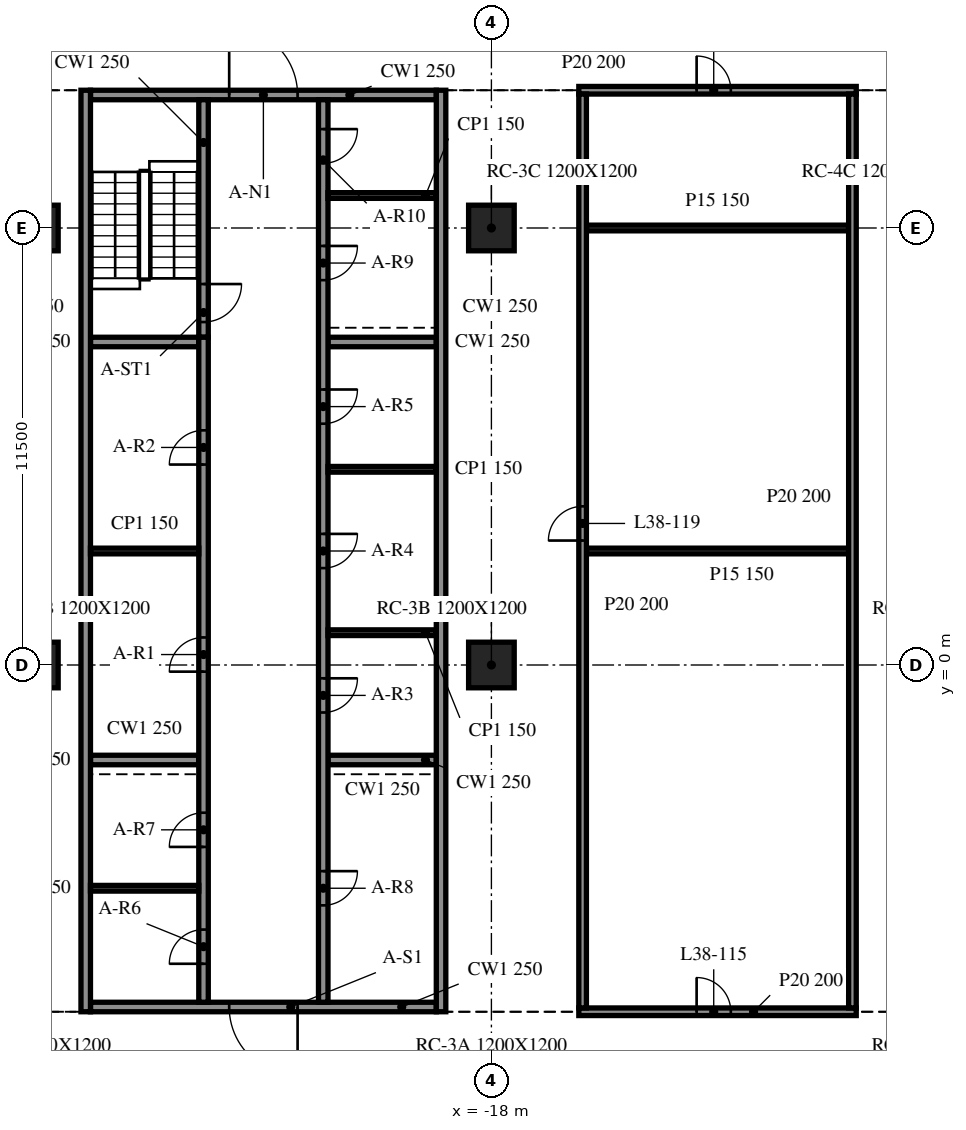
"""IFC4 building model, lengths in metres.
Left out: names, types, materials, properties, quantities, classifications, styles, units other than length and angle.
Written with IfcOpenShell. Run it as: python <this file> out.ifc"""

import sys

from ifc_helpers import new_model, si_unit, direction, frame, frame_2d, origin, origin_2d, place, context, subcontext, project, spatial, rectangle, extrude, element, fill, save


model = new_model("IFC4")
c1 = context("Model", 3, precision=1e-05, world=origin(), true_north=direction((0.0, 1.0)))
c2 = subcontext(c1, "Body", "Model", "MODEL_VIEW")
j1 = project(units=[si_unit("LENGTHUNIT", "METRE"), si_unit("PLANEANGLEUNIT", "RADIAN")], contexts=[c1])
p1 = place(None, origin())
s1 = spatial("IfcSite", under=j1, at=p1, CompositionType="ELEMENT")
p2 = place(p1, origin())
s2 = spatial("IfcBuilding", under=s1, at=p2, CompositionType="ELEMENT")
p3 = place(p2, frame((0.0, 0.0, 163.0)))
s3 = spatial("IfcBuildingStorey", under=s2, at=p3, CompositionType="ELEMENT", Elevation=163.0)
for number, where, z_axis, x_axis in (
    (1, (-30.0, 0.0, -0.34), (0.0, 0.0, 1.0), (1.0, 0.0, 0.0)),
    (2, (-30.0, 11.5, -0.34), (0.0, 0.0, 1.0), (1.0, 0.0, 0.0)),
    (3, (-18.0, 0.0, -0.34), (0.0, 0.0, 1.0), (1.0, 0.0, 0.0)),
    (4, (-18.0, 11.5, -0.34), (0.0, 0.0, 1.0), (1.0, 0.0, 0.0)),
):
    element("IfcColumn", number, at=place(p3, frame(where, z_axis=z_axis, x_axis=x_axis)), inside=s3, PredefinedType="COLUMN", context=c2, shape_type="SweptSolid", body=[
        extrude(rectangle(XDim=1.2, YDim=1.2, at=origin_2d()), origin(), (0.0, 0.0, 1.0), 3.8),
    ])
for number, where, z_axis, x_axis in (
    (5, (-28.675, 15.125, 0.0), (0.0, 0.0, 1.0), (0.0, -1.0, 0.0)),
    (6, (-19.325, -9.125, 0.0), (0.0, 0.0, 1.0), (0.0, 1.0, 0.0)),
):
    element("IfcWall", number, at=place(p3, frame(where, z_axis=z_axis, x_axis=x_axis)), inside=s3, PredefinedType="SOLIDWALL", context=c2, shape_type="SweptSolid", body=[
        extrude(rectangle(XDim=24.25, YDim=0.25, at=frame_2d((12.125, 0.0))), origin(), (0.0, 0.0, 1.0), 3.46),
    ])
p4 = place(p3, frame((-19.45, -9.0, 0.0), z_axis=(0.0, 0.0, 1.0), x_axis=(-1.0, 0.0, 0.0)))
e7 = element("IfcWall", 7, at=p4, inside=s3, PredefinedType="SOLIDWALL", context=c2, shape_type="SweptSolid", body=[
    extrude(rectangle(XDim=9.1, YDim=0.25, at=frame_2d((4.55, 0.0))), origin(), (0.0, 0.0, 1.0), 3.46),
])
p5 = place(p4, frame((3.65, 0.0, 0.0)))
e8 = element("IfcOpeningElement", 8, at=p5, cuts=e7, PredefinedType="OPENING", context=c2, shape_type="SweptSolid", body=[
    extrude(rectangle(XDim=1.8, YDim=2.1, at=frame_2d((0.9, 1.05))), frame((0.0, 0.135, 0.0), z_axis=(0.0, -1.0, 0.0), x_axis=(1.0, 0.0, 0.0)), (0.0, 0.0, 1.0), 0.27),
])
p6 = place(p3, frame((-28.55, 15.0, 0.0), z_axis=(0.0, 0.0, 1.0), x_axis=(1.0, 0.0, 0.0)))
e9 = element("IfcWall", 9, at=p6, inside=s3, PredefinedType="SOLIDWALL", context=c2, shape_type="SweptSolid", body=[
    extrude(rectangle(XDim=9.1, YDim=0.25, at=frame_2d((4.55, 0.0))), origin(), (0.0, 0.0, 1.0), 3.46),
])
p7 = place(p6, frame((3.65, 0.0, 0.0)))
e10 = element("IfcOpeningElement", 10, at=p7, cuts=e9, PredefinedType="OPENING", context=c2, shape_type="SweptSolid", body=[
    extrude(rectangle(XDim=1.8, YDim=2.1, at=frame_2d((0.9, 1.05))), frame((0.0, 0.135, 0.0), z_axis=(0.0, -1.0, 0.0), x_axis=(1.0, 0.0, 0.0)), (0.0, 0.0, 1.0), 0.27),
])
p8 = place(p3, frame((-25.575, -8.875, 0.0), z_axis=(0.0, 0.0, 1.0), x_axis=(0.0, 1.0, 0.0)))
e11 = element("IfcWall", 11, at=p8, inside=s3, PredefinedType="SOLIDWALL", context=c2, shape_type="SweptSolid", body=[
    extrude(rectangle(XDim=17.5, YDim=0.25, at=frame_2d((8.75, 0.0))), origin(), (0.0, 0.0, 1.0), 3.46),
])
p9 = place(p8, frame((8.7, 0.0, 0.0)))
e12 = element("IfcOpeningElement", 12, at=p9, cuts=e11, PredefinedType="OPENING", context=c2, shape_type="SweptSolid", body=[
    extrude(rectangle(XDim=0.9, YDim=2.1, at=frame_2d((0.45, 1.05))), frame((0.0, 0.135, 0.0), z_axis=(0.0, -1.0, 0.0), x_axis=(1.0, 0.0, 0.0)), (0.0, 0.0, 1.0), 0.27),
])
p10 = place(p8, frame((14.15, 0.0, 0.0)))
e13 = element("IfcOpeningElement", 13, at=p10, cuts=e11, PredefinedType="OPENING", context=c2, shape_type="SweptSolid", body=[
    extrude(rectangle(XDim=0.9, YDim=2.1, at=frame_2d((0.45, 1.05))), frame((0.0, 0.135, 0.0), z_axis=(0.0, -1.0, 0.0), x_axis=(1.0, 0.0, 0.0)), (0.0, 0.0, 1.0), 0.27),
])
p11 = place(p8, frame((1.012, 0.0, 0.0)))
e14 = element("IfcOpeningElement", 14, at=p11, cuts=e11, PredefinedType="OPENING", context=c2, shape_type="SweptSolid", body=[
    extrude(rectangle(XDim=0.9, YDim=2.1, at=frame_2d((0.45, 1.05))), frame((0.0, 0.135, 0.0), z_axis=(0.0, -1.0, 0.0), x_axis=(1.0, 0.0, 0.0)), (0.0, 0.0, 1.0), 0.27),
])
p12 = place(p8, frame((4.087, 0.0, 0.0)))
e15 = element("IfcOpeningElement", 15, at=p12, cuts=e11, PredefinedType="OPENING", context=c2, shape_type="SweptSolid", body=[
    extrude(rectangle(XDim=0.9, YDim=2.1, at=frame_2d((0.45, 1.05))), frame((0.0, 0.135, 0.0), z_axis=(0.0, -1.0, 0.0), x_axis=(1.0, 0.0, 0.0)), (0.0, 0.0, 1.0), 0.27),
])
p13 = place(p3, frame((-25.575, 14.875, 0.0), z_axis=(0.0, 0.0, 1.0), x_axis=(0.0, -1.0, 0.0)))
e16 = element("IfcWall", 16, at=p13, inside=s3, PredefinedType="SOLIDWALL", context=c2, shape_type="SweptSolid", body=[
    extrude(rectangle(XDim=6.25, YDim=0.25, at=frame_2d((3.125, 0.0))), origin(), (0.0, 0.0, 1.0), 3.46),
])
p14 = place(p13, frame((4.85, 0.0, 0.0)))
e17 = element("IfcOpeningElement", 17, at=p14, cuts=e16, PredefinedType="OPENING", context=c2, shape_type="SweptSolid", body=[
    extrude(rectangle(XDim=1.0, YDim=2.1, at=frame_2d((0.5, 1.05))), frame((0.0, 0.135, 0.0), z_axis=(0.0, -1.0, 0.0), x_axis=(1.0, 0.0, 0.0)), (0.0, 0.0, 1.0), 0.27),
])
p15 = place(p3, frame((-22.425, 14.875, 0.0), z_axis=(0.0, 0.0, 1.0), x_axis=(0.0, -1.0, 0.0)))
e18 = element("IfcWall", 18, at=p15, inside=s3, PredefinedType="SOLIDWALL", context=c2, shape_type="SweptSolid", body=[
    extrude(rectangle(XDim=23.75, YDim=0.25, at=frame_2d((11.875, 0.0))), origin(), (0.0, 0.0, 1.0), 3.46),
])
p16 = place(p15, frame((15.225, 0.0, 0.0)))
e19 = element("IfcOpeningElement", 19, at=p16, cuts=e18, PredefinedType="OPENING", context=c2, shape_type="SweptSolid", body=[
    extrude(rectangle(XDim=0.9, YDim=2.1, at=frame_2d((0.45, 1.05))), frame((0.0, 0.135, 0.0), z_axis=(0.0, -1.0, 0.0), x_axis=(1.0, 0.0, 0.0)), (0.0, 0.0, 1.0), 0.27),
])
p17 = place(p15, frame((11.425, 0.0, 0.0)))
e20 = element("IfcOpeningElement", 20, at=p17, cuts=e18, PredefinedType="OPENING", context=c2, shape_type="SweptSolid", body=[
    extrude(rectangle(XDim=0.9, YDim=2.1, at=frame_2d((0.45, 1.05))), frame((0.0, 0.135, 0.0), z_axis=(0.0, -1.0, 0.0), x_axis=(1.0, 0.0, 0.0)), (0.0, 0.0, 1.0), 0.27),
])
p18 = place(p15, frame((7.625, 0.0, 0.0)))
e21 = element("IfcOpeningElement", 21, at=p18, cuts=e18, PredefinedType="OPENING", context=c2, shape_type="SweptSolid", body=[
    extrude(rectangle(XDim=0.9, YDim=2.1, at=frame_2d((0.45, 1.05))), frame((0.0, 0.135, 0.0), z_axis=(0.0, -1.0, 0.0), x_axis=(1.0, 0.0, 0.0)), (0.0, 0.0, 1.0), 0.27),
])
p19 = place(p15, frame((20.3, 0.0, 0.0)))
e22 = element("IfcOpeningElement", 22, at=p19, cuts=e18, PredefinedType="OPENING", context=c2, shape_type="SweptSolid", body=[
    extrude(rectangle(XDim=0.9, YDim=2.1, at=frame_2d((0.45, 1.05))), frame((0.0, 0.135, 0.0), z_axis=(0.0, -1.0, 0.0), x_axis=(1.0, 0.0, 0.0)), (0.0, 0.0, 1.0), 0.27),
])
p20 = place(p15, frame((3.847, 0.0, 0.0)))
e23 = element("IfcOpeningElement", 23, at=p20, cuts=e18, PredefinedType="OPENING", context=c2, shape_type="SweptSolid", body=[
    extrude(rectangle(XDim=0.9, YDim=2.1, at=frame_2d((0.45, 1.05))), frame((0.0, 0.135, 0.0), z_axis=(0.0, -1.0, 0.0), x_axis=(1.0, 0.0, 0.0)), (0.0, 0.0, 1.0), 0.27),
])
p21 = place(p15, frame((0.772, 0.0, 0.0)))
e24 = element("IfcOpeningElement", 24, at=p21, cuts=e18, PredefinedType="OPENING", context=c2, shape_type="SweptSolid", body=[
    extrude(rectangle(XDim=0.9, YDim=2.1, at=frame_2d((0.45, 1.05))), frame((0.0, 0.135, 0.0), z_axis=(0.0, -1.0, 0.0), x_axis=(1.0, 0.0, 0.0)), (0.0, 0.0, 1.0), 0.27),
])
for number, where, z_axis, x_axis in (
    (25, (-28.55, -2.5, 0.0), (0.0, 0.0, 1.0), (1.0, 0.0, 0.0)),
    (26, (-28.55, 8.5, 0.0), (0.0, 0.0, 1.0), (1.0, 0.0, 0.0)),
    (27, (-22.3, -2.5, 0.0), (0.0, 0.0, 1.0), (1.0, 0.0, 0.0)),
    (28, (-22.3, 8.5, 0.0), (0.0, 0.0, 1.0), (1.0, 0.0, 0.0)),
):
    element("IfcWall", number, at=place(p3, frame(where, z_axis=z_axis, x_axis=x_axis)), inside=s3, PredefinedType="SOLIDWALL", context=c2, shape_type="SweptSolid", body=[
        extrude(rectangle(XDim=2.85, YDim=0.25, at=frame_2d((1.425, 0.0))), origin(), (0.0, 0.0, 1.0), 3.46),
    ])
for number, where, z_axis, x_axis in (
    (29, (-28.55, 3.0, 0.0), (0.0, 0.0, 1.0), (1.0, 0.0, 0.0)),
    (30, (-22.3, 0.85, 0.0), (0.0, 0.0, 1.0), (1.0, 0.0, 0.0)),
    (31, (-22.3, 5.15, 0.0), (0.0, 0.0, 1.0), (1.0, 0.0, 0.0)),
    (32, (-28.55, -5.875, 0.0), (0.0, 0.0, 1.0), (1.0, 0.0, 0.0)),
    (33, (-22.3, 12.355, 0.0), (0.0, 0.0, 1.0), (1.0, 0.0, 0.0)),
):
    element("IfcWall", number, at=place(p3, frame(where, z_axis=z_axis, x_axis=x_axis)), inside=s3, PredefinedType="PARTITIONING", context=c2, shape_type="SweptSolid", body=[
        extrude(rectangle(XDim=2.85, YDim=0.15, at=frame_2d((1.425, 0.0))), origin(), (0.0, 0.0, 1.0), 3.46),
    ])
p22 = place(p3, frame((-15.7, -9.125, 0.0), z_axis=(0.0, 0.0, 1.0), x_axis=(1.0, 0.0, 0.0)))
e34 = element("IfcWall", 34, at=p22, inside=s3, PredefinedType="PARTITIONING", context=c2, shape_type="SweptSolid", body=[
    extrude(rectangle(XDim=7.3, YDim=0.2, at=frame_2d((3.65, 0.0))), origin(), (0.0, 0.0, 1.0), 3.46),
])
p23 = place(p22, frame((3.1, 0.0, 0.0)))
e35 = element("IfcOpeningElement", 35, at=p23, cuts=e34, PredefinedType="OPENING", context=c2, shape_type="SweptSolid", body=[
    extrude(rectangle(XDim=0.9, YDim=2.1, at=frame_2d((0.45, 1.05))), frame((0.0, 0.11, 0.0), z_axis=(0.0, -1.0, 0.0), x_axis=(1.0, 0.0, 0.0)), (0.0, 0.0, 1.0), 0.22),
])
for number, where, z_axis, x_axis in (
    (36, (-15.5, 3.0, 0.0), (0.0, 0.0, 1.0), (1.0, 0.0, 0.0)),
    (37, (-15.5, 11.5, 0.0), (0.0, 0.0, 1.0), (1.0, 0.0, 0.0)),
):
    element("IfcWall", number, at=place(p3, frame(where, z_axis=z_axis, x_axis=x_axis)), inside=s3, PredefinedType="PARTITIONING", context=c2, shape_type="SweptSolid", body=[
        extrude(rectangle(XDim=6.9, YDim=0.15, at=frame_2d((3.45, 0.0))), origin(), (0.0, 0.0, 1.0), 3.46),
    ])
p24 = place(p3, frame((-15.7, 15.125, 0.0), z_axis=(0.0, 0.0, 1.0), x_axis=(1.0, 0.0, 0.0)))
e38 = element("IfcWall", 38, at=p24, inside=s3, PredefinedType="PARTITIONING", context=c2, shape_type="SweptSolid", body=[
    extrude(rectangle(XDim=7.3, YDim=0.2, at=frame_2d((3.65, 0.0))), origin(), (0.0, 0.0, 1.0), 3.46),
])
p25 = place(p24, frame((3.1, 0.0, 0.0)))
e39 = element("IfcOpeningElement", 39, at=p25, cuts=e38, PredefinedType="OPENING", context=c2, shape_type="SweptSolid", body=[
    extrude(rectangle(XDim=0.9, YDim=2.1, at=frame_2d((0.45, 1.05))), frame((0.0, 0.11, 0.0), z_axis=(0.0, -1.0, 0.0), x_axis=(1.0, 0.0, 0.0)), (0.0, 0.0, 1.0), 0.22),
])
p26 = place(p3, frame((-15.6, -9.025, 0.0), z_axis=(0.0, 0.0, 1.0), x_axis=(0.0, 1.0, 0.0)))
e40 = element("IfcWall", 40, at=p26, inside=s3, PredefinedType="PARTITIONING", context=c2, shape_type="SweptSolid", body=[
    extrude(rectangle(XDim=24.05, YDim=0.2, at=frame_2d((12.025, 0.0))), origin(), (0.0, 0.0, 1.0), 3.46),
])
p27 = place(p26, frame((12.3, 0.0, 0.0)))
e41 = element("IfcOpeningElement", 41, at=p27, cuts=e40, PredefinedType="OPENING", context=c2, shape_type="SweptSolid", body=[
    extrude(rectangle(XDim=0.9, YDim=2.1, at=frame_2d((0.45, 1.05))), frame((0.0, 0.11, 0.0), z_axis=(0.0, -1.0, 0.0), x_axis=(1.0, 0.0, 0.0)), (0.0, 0.0, 1.0), 0.22),
])
p28 = place(p3, frame((-8.5, -9.025, 0.0), z_axis=(0.0, 0.0, 1.0), x_axis=(0.0, 1.0, 0.0)))
e42 = element("IfcWall", 42, at=p28, inside=s3, PredefinedType="PARTITIONING", context=c2, shape_type="SweptSolid", body=[
    extrude(rectangle(XDim=24.05, YDim=0.2, at=frame_2d((12.025, 0.0))), origin(), (0.0, 0.0, 1.0), 3.46),
])
p29 = place(p5, origin())
e43 = element("IfcDoor", 43, at=p29, inside=s3, OperationType="DOUBLE_DOOR_SINGLE_SWING", PredefinedType="DOOR", context=c2, shape_type="SweptSolid", body=[
    extrude(rectangle(XDim=1.8, YDim=2.1, at=frame_2d((0.9, 1.05))), frame((0.0, 0.025, 0.0), z_axis=(0.0, -1.0, 0.0), x_axis=(1.0, 0.0, 0.0)), (0.0, 0.0, 1.0), 0.05),
])
fill(e8, e43)
p30 = place(p7, origin())
e44 = element("IfcDoor", 44, at=p30, inside=s3, OperationType="DOUBLE_DOOR_SINGLE_SWING", PredefinedType="DOOR", context=c2, shape_type="SweptSolid", body=[
    extrude(rectangle(XDim=1.8, YDim=2.1, at=frame_2d((0.9, 1.05))), frame((0.0, 0.025, 0.0), z_axis=(0.0, -1.0, 0.0), x_axis=(1.0, 0.0, 0.0)), (0.0, 0.0, 1.0), 0.05),
])
fill(e10, e44)
p31 = place(p9, origin())
e45 = element("IfcDoor", 45, at=p31, inside=s3, OperationType="SINGLE_SWING_LEFT", PredefinedType="DOOR", context=c2, shape_type="SweptSolid", body=[
    extrude(rectangle(XDim=0.9, YDim=2.1, at=frame_2d((0.45, 1.05))), frame((0.0, 0.025, 0.0), z_axis=(0.0, -1.0, 0.0), x_axis=(1.0, 0.0, 0.0)), (0.0, 0.0, 1.0), 0.05),
])
fill(e12, e45)
p32 = place(p10, origin())
e46 = element("IfcDoor", 46, at=p32, inside=s3, OperationType="SINGLE_SWING_RIGHT", PredefinedType="DOOR", context=c2, shape_type="SweptSolid", body=[
    extrude(rectangle(XDim=0.9, YDim=2.1, at=frame_2d((0.45, 1.05))), frame((0.0, 0.025, 0.0), z_axis=(0.0, -1.0, 0.0), x_axis=(1.0, 0.0, 0.0)), (0.0, 0.0, 1.0), 0.05),
])
fill(e13, e46)
p33 = place(p16, origin())
e47 = element("IfcDoor", 47, at=p33, inside=s3, OperationType="SINGLE_SWING_LEFT", PredefinedType="DOOR", context=c2, shape_type="SweptSolid", body=[
    extrude(rectangle(XDim=0.9, YDim=2.1, at=frame_2d((0.45, 1.05))), frame((0.0, 0.025, 0.0), z_axis=(0.0, -1.0, 0.0), x_axis=(1.0, 0.0, 0.0)), (0.0, 0.0, 1.0), 0.05),
])
fill(e19, e47)
p34 = place(p17, origin())
e48 = element("IfcDoor", 48, at=p34, inside=s3, OperationType="SINGLE_SWING_RIGHT", PredefinedType="DOOR", context=c2, shape_type="SweptSolid", body=[
    extrude(rectangle(XDim=0.9, YDim=2.1, at=frame_2d((0.45, 1.05))), frame((0.0, 0.025, 0.0), z_axis=(0.0, -1.0, 0.0), x_axis=(1.0, 0.0, 0.0)), (0.0, 0.0, 1.0), 0.05),
])
fill(e20, e48)
p35 = place(p18, origin())
e49 = element("IfcDoor", 49, at=p35, inside=s3, OperationType="SINGLE_SWING_LEFT", PredefinedType="DOOR", context=c2, shape_type="SweptSolid", body=[
    extrude(rectangle(XDim=0.9, YDim=2.1, at=frame_2d((0.45, 1.05))), frame((0.0, 0.025, 0.0), z_axis=(0.0, -1.0, 0.0), x_axis=(1.0, 0.0, 0.0)), (0.0, 0.0, 1.0), 0.05),
])
fill(e21, e49)
p36 = place(p11, origin())
e50 = element("IfcDoor", 50, at=p36, inside=s3, OperationType="SINGLE_SWING_RIGHT", PredefinedType="DOOR", context=c2, shape_type="SweptSolid", body=[
    extrude(rectangle(XDim=0.9, YDim=2.1, at=frame_2d((0.45, 1.05))), frame((0.0, 0.025, 0.0), z_axis=(0.0, -1.0, 0.0), x_axis=(1.0, 0.0, 0.0)), (0.0, 0.0, 1.0), 0.05),
])
fill(e14, e50)
p37 = place(p12, origin())
e51 = element("IfcDoor", 51, at=p37, inside=s3, OperationType="SINGLE_SWING_LEFT", PredefinedType="DOOR", context=c2, shape_type="SweptSolid", body=[
    extrude(rectangle(XDim=0.9, YDim=2.1, at=frame_2d((0.45, 1.05))), frame((0.0, 0.025, 0.0), z_axis=(0.0, -1.0, 0.0), x_axis=(1.0, 0.0, 0.0)), (0.0, 0.0, 1.0), 0.05),
])
fill(e15, e51)
p38 = place(p19, origin())
e52 = element("IfcDoor", 52, at=p38, inside=s3, OperationType="SINGLE_SWING_RIGHT", PredefinedType="DOOR", context=c2, shape_type="SweptSolid", body=[
    extrude(rectangle(XDim=0.9, YDim=2.1, at=frame_2d((0.45, 1.05))), frame((0.0, 0.025, 0.0), z_axis=(0.0, -1.0, 0.0), x_axis=(1.0, 0.0, 0.0)), (0.0, 0.0, 1.0), 0.05),
])
fill(e22, e52)
p39 = place(p20, origin())
e53 = element("IfcDoor", 53, at=p39, inside=s3, OperationType="SINGLE_SWING_LEFT", PredefinedType="DOOR", context=c2, shape_type="SweptSolid", body=[
    extrude(rectangle(XDim=0.9, YDim=2.1, at=frame_2d((0.45, 1.05))), frame((0.0, 0.025, 0.0), z_axis=(0.0, -1.0, 0.0), x_axis=(1.0, 0.0, 0.0)), (0.0, 0.0, 1.0), 0.05),
])
fill(e23, e53)
p40 = place(p21, origin())
e54 = element("IfcDoor", 54, at=p40, inside=s3, OperationType="SINGLE_SWING_RIGHT", PredefinedType="DOOR", context=c2, shape_type="SweptSolid", body=[
    extrude(rectangle(XDim=0.9, YDim=2.1, at=frame_2d((0.45, 1.05))), frame((0.0, 0.025, 0.0), z_axis=(0.0, -1.0, 0.0), x_axis=(1.0, 0.0, 0.0)), (0.0, 0.0, 1.0), 0.05),
])
fill(e24, e54)
p41 = place(p14, origin())
e55 = element("IfcDoor", 55, at=p41, inside=s3, OperationType="SINGLE_SWING_LEFT", PredefinedType="DOOR", context=c2, shape_type="SweptSolid", body=[
    extrude(rectangle(XDim=1.0, YDim=2.1, at=frame_2d((0.5, 1.05))), frame((0.0, 0.025, 0.0), z_axis=(0.0, -1.0, 0.0), x_axis=(1.0, 0.0, 0.0)), (0.0, 0.0, 1.0), 0.05),
])
fill(e17, e55)
p42 = place(p23, origin())
e56 = element("IfcDoor", 56, at=p42, inside=s3, OperationType="SINGLE_SWING_LEFT", PredefinedType="DOOR", context=c2, shape_type="SweptSolid", body=[
    extrude(rectangle(XDim=0.9, YDim=2.1, at=frame_2d((0.45, 1.05))), frame((0.0, 0.025, 0.0), z_axis=(0.0, -1.0, 0.0), x_axis=(1.0, 0.0, 0.0)), (0.0, 0.0, 1.0), 0.05),
])
fill(e35, e56)
p43 = place(p27, origin())
e57 = element("IfcDoor", 57, at=p43, inside=s3, OperationType="SINGLE_SWING_LEFT", PredefinedType="DOOR", context=c2, shape_type="SweptSolid", body=[
    extrude(rectangle(XDim=0.9, YDim=2.1, at=frame_2d((0.45, 1.05))), frame((0.0, 0.025, 0.0), z_axis=(0.0, -1.0, 0.0), x_axis=(1.0, 0.0, 0.0)), (0.0, 0.0, 1.0), 0.05),
])
fill(e41, e57)
p44 = place(p25, origin())
e58 = element("IfcDoor", 58, at=p44, inside=s3, OperationType="SINGLE_SWING_RIGHT", PredefinedType="DOOR", context=c2, shape_type="SweptSolid", body=[
    extrude(rectangle(XDim=0.9, YDim=2.1, at=frame_2d((0.45, 1.05))), frame((0.0, 0.025, 0.0), z_axis=(0.0, -1.0, 0.0), x_axis=(1.0, 0.0, 0.0)), (0.0, 0.0, 1.0), 0.05),
])
fill(e39, e58)
save(model, sys.argv[1])
